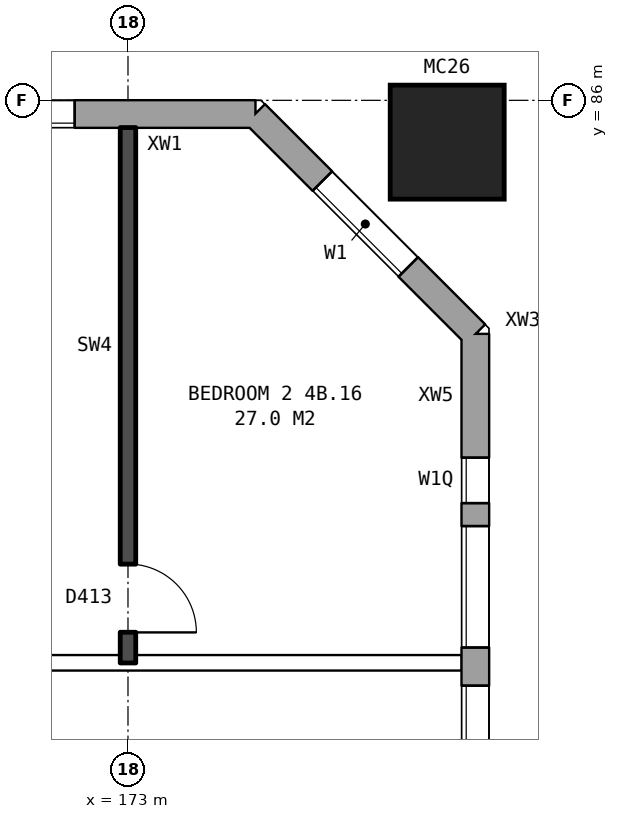
"""IFC4 building model, lengths in metres.
Left out: names, types, materials, properties, quantities, classifications, styles, units other than length and angle.
Written with IfcOpenShell. Run it as: python <this file> out.ifc"""

import sys

from ifc_helpers import new_model, si_unit, direction, frame, frame_2d, origin, origin_2d, place, context, subcontext, project, spatial, rectangle, hollow_rectangle, extrude, element, fill, save


model = new_model("IFC4")
c1 = context("Model", 3, precision=1e-05, world=origin(), true_north=direction((0.0, 1.0)))
c2 = subcontext(c1, "Body", "Model", "MODEL_VIEW")
j1 = project(units=[si_unit("LENGTHUNIT", "METRE"), si_unit("PLANEANGLEUNIT", "RADIAN")], contexts=[c1])
p1 = place(None, origin())
s1 = spatial("IfcSite", under=j1, at=p1, CompositionType="ELEMENT")
p2 = place(p1, origin())
s2 = spatial("IfcBuilding", under=s1, at=p2, CompositionType="ELEMENT")
p3 = place(p2, frame((0.0, 0.0, 19.5)))
s3 = spatial("IfcBuildingStorey", under=s2, at=p3, CompositionType="ELEMENT", Elevation=19.5)
p4 = place(p3, frame((177.2, 85.45, 0.0), z_axis=(0.0, 0.0, 1.0), x_axis=(1.0, 0.0, 0.0)))
e1 = element("IfcColumn", 1, at=p4, inside=s3, PredefinedType="COLUMN", context=c2, shape_type="SweptSolid", body=[
    extrude(hollow_rectangle(XDim=1.5, YDim=1.5, WallThickness=0.08, at=origin_2d()), origin(), (0.0, 0.0, 1.0), 3.1),
])
p5 = place(p3, frame((177.57, 57.075, 0.0), z_axis=(0.0, 0.0, 1.0), x_axis=(0.0, 1.0, 0.0)))
e2 = element("IfcWall", 2, at=p5, inside=s3, PredefinedType="STANDARD", context=c2, shape_type="SweptSolid", body=[
    extrude(rectangle(XDim=25.851, YDim=0.36, at=frame_2d((12.925, 0.0))), origin(), (0.0, 0.0, 1.0), 2.85),
])
p6 = place(p5, frame((1.0, 0.0, 0.8)))
e3 = element("IfcOpeningElement", 3, at=p6, cuts=e2, PredefinedType="OPENING", context=c2, shape_type="SweptSolid", body=[
    extrude(rectangle(XDim=1.2, YDim=0.9, at=frame_2d((0.6, 0.45))), frame((0.0, 0.19, 0.0), z_axis=(0.0, -1.0, 0.0), x_axis=(1.0, 0.0, 0.0)), (0.0, 0.0, 1.0), 0.38),
])
p7 = place(p5, frame((4.625, 0.0, 0.8)))
e4 = element("IfcOpeningElement", 4, at=p7, cuts=e2, PredefinedType="OPENING", context=c2, shape_type="SweptSolid", body=[
    extrude(rectangle(XDim=1.6, YDim=1.8, at=frame_2d((0.8, 0.9))), frame((0.0, 0.19, 0.0), z_axis=(0.0, -1.0, 0.0), x_axis=(1.0, 0.0, 0.0)), (0.0, 0.0, 1.0), 0.38),
])
p8 = place(p5, frame((7.625, 0.0, 0.8)))
e5 = element("IfcOpeningElement", 5, at=p8, cuts=e2, PredefinedType="OPENING", context=c2, shape_type="SweptSolid", body=[
    extrude(rectangle(XDim=1.6, YDim=1.8, at=frame_2d((0.8, 0.9))), frame((0.0, 0.19, 0.0), z_axis=(0.0, -1.0, 0.0), x_axis=(1.0, 0.0, 0.0)), (0.0, 0.0, 1.0), 0.38),
])
p9 = place(p5, frame((10.625, 0.0, 0.8)))
e6 = element("IfcOpeningElement", 6, at=p9, cuts=e2, PredefinedType="OPENING", context=c2, shape_type="SweptSolid", body=[
    extrude(rectangle(XDim=1.6, YDim=1.8, at=frame_2d((0.8, 0.9))), frame((0.0, 0.19, 0.0), z_axis=(0.0, -1.0, 0.0), x_axis=(1.0, 0.0, 0.0)), (0.0, 0.0, 1.0), 0.38),
])
p10 = place(p5, frame((13.625, 0.0, 0.8)))
e7 = element("IfcOpeningElement", 7, at=p10, cuts=e2, PredefinedType="OPENING", context=c2, shape_type="SweptSolid", body=[
    extrude(rectangle(XDim=1.6, YDim=1.8, at=frame_2d((0.8, 0.9))), frame((0.0, 0.19, 0.0), z_axis=(0.0, -1.0, 0.0), x_axis=(1.0, 0.0, 0.0)), (0.0, 0.0, 1.0), 0.38),
])
p11 = place(p5, frame((16.625, 0.0, 0.8)))
e8 = element("IfcOpeningElement", 8, at=p11, cuts=e2, PredefinedType="OPENING", context=c2, shape_type="SweptSolid", body=[
    extrude(rectangle(XDim=1.6, YDim=1.8, at=frame_2d((0.8, 0.9))), frame((0.0, 0.19, 0.0), z_axis=(0.0, -1.0, 0.0), x_axis=(1.0, 0.0, 0.0)), (0.0, 0.0, 1.0), 0.38),
])
p12 = place(p5, frame((19.625, 0.0, 0.8)))
e9 = element("IfcOpeningElement", 9, at=p12, cuts=e2, PredefinedType="OPENING", context=c2, shape_type="SweptSolid", body=[
    extrude(rectangle(XDim=1.6, YDim=1.8, at=frame_2d((0.8, 0.9))), frame((0.0, 0.19, 0.0), z_axis=(0.0, -1.0, 0.0), x_axis=(1.0, 0.0, 0.0)), (0.0, 0.0, 1.0), 0.38),
])
p13 = place(p5, frame((21.725, 0.0, 0.8)))
e10 = element("IfcOpeningElement", 10, at=p13, cuts=e2, PredefinedType="OPENING", context=c2, shape_type="SweptSolid", body=[
    extrude(rectangle(XDim=1.6, YDim=1.8, at=frame_2d((0.8, 0.9))), frame((0.0, 0.19, 0.0), z_axis=(0.0, -1.0, 0.0), x_axis=(1.0, 0.0, 0.0)), (0.0, 0.0, 1.0), 0.38),
])
p14 = place(p5, frame((2.5, 0.0, 0.8)))
e11 = element("IfcOpeningElement", 11, at=p14, cuts=e2, PredefinedType="OPENING", context=c2, shape_type="SweptSolid", body=[
    extrude(rectangle(XDim=1.4, YDim=1.8, at=frame_2d((0.7, 0.9))), frame((0.0, 0.19, 0.0), z_axis=(0.0, -1.0, 0.0), x_axis=(1.0, 0.0, 0.0)), (0.0, 0.0, 1.0), 0.38),
])
p15 = place(p5, frame((23.625, 0.0, 0.8)))
e12 = element("IfcOpeningElement", 12, at=p15, cuts=e2, PredefinedType="OPENING", context=c2, shape_type="SweptSolid", body=[
    extrude(rectangle(XDim=0.6, YDim=1.2, at=frame_2d((0.3, 0.6))), frame((0.0, 0.19, 0.0), z_axis=(0.0, -1.0, 0.0), x_axis=(1.0, 0.0, 0.0)), (0.0, 0.0, 1.0), 0.38),
])
p16 = place(p3, frame((177.57, 82.925, 0.0), z_axis=(0.0, 0.0, 1.0), x_axis=(-0.707106781187, 0.707106781187, 0.0)))
e13 = element("IfcWall", 13, at=p16, inside=s3, PredefinedType="STANDARD", context=c2, shape_type="SweptSolid", body=[
    extrude(rectangle(XDim=4.094, YDim=0.36, at=frame_2d((2.047, 0.0))), origin(), (0.0, 0.0, 1.0), 2.85),
])
p17 = place(p16, frame((1.247, 0.0, 0.8)))
e14 = element("IfcOpeningElement", 14, at=p17, cuts=e13, PredefinedType="OPENING", context=c2, shape_type="SweptSolid", body=[
    extrude(rectangle(XDim=1.6, YDim=1.8, at=frame_2d((0.8, 0.9))), frame((0.0, 0.19, 0.0), z_axis=(0.0, -1.0, 0.0), x_axis=(1.0, 0.0, 0.0)), (0.0, 0.0, 1.0), 0.38),
])
p18 = place(p3, frame((174.675, 85.82, 0.0), z_axis=(0.0, 0.0, 1.0), x_axis=(-1.0, 0.0, 0.0)))
e15 = element("IfcWall", 15, at=p18, inside=s3, PredefinedType="STANDARD", context=c2, shape_type="SweptSolid", body=[
    extrude(rectangle(XDim=40.601, YDim=0.36, at=frame_2d((20.3, 0.0))), origin(), (0.0, 0.0, 1.0), 2.85),
])
p19 = place(p18, frame((2.375, 0.0, 0.8)))
e16 = element("IfcOpeningElement", 16, at=p19, cuts=e15, PredefinedType="OPENING", context=c2, shape_type="SweptSolid", body=[
    extrude(rectangle(XDim=1.6, YDim=1.8, at=frame_2d((0.8, 0.9))), frame((0.0, 0.19, 0.0), z_axis=(0.0, -1.0, 0.0), x_axis=(1.0, 0.0, 0.0)), (0.0, 0.0, 1.0), 0.38),
])
p20 = place(p18, frame((5.375, 0.0, 0.8)))
e17 = element("IfcOpeningElement", 17, at=p20, cuts=e15, PredefinedType="OPENING", context=c2, shape_type="SweptSolid", body=[
    extrude(rectangle(XDim=1.6, YDim=1.8, at=frame_2d((0.8, 0.9))), frame((0.0, 0.19, 0.0), z_axis=(0.0, -1.0, 0.0), x_axis=(1.0, 0.0, 0.0)), (0.0, 0.0, 1.0), 0.38),
])
p21 = place(p18, frame((8.375, 0.0, 0.8)))
e18 = element("IfcOpeningElement", 18, at=p21, cuts=e15, PredefinedType="OPENING", context=c2, shape_type="SweptSolid", body=[
    extrude(rectangle(XDim=1.6, YDim=1.8, at=frame_2d((0.8, 0.9))), frame((0.0, 0.19, 0.0), z_axis=(0.0, -1.0, 0.0), x_axis=(1.0, 0.0, 0.0)), (0.0, 0.0, 1.0), 0.38),
])
p22 = place(p18, frame((11.375, 0.0, 0.8)))
e19 = element("IfcOpeningElement", 19, at=p22, cuts=e15, PredefinedType="OPENING", context=c2, shape_type="SweptSolid", body=[
    extrude(rectangle(XDim=1.6, YDim=1.8, at=frame_2d((0.8, 0.9))), frame((0.0, 0.19, 0.0), z_axis=(0.0, -1.0, 0.0), x_axis=(1.0, 0.0, 0.0)), (0.0, 0.0, 1.0), 0.38),
])
p23 = place(p18, frame((14.375, 0.0, 0.8)))
e20 = element("IfcOpeningElement", 20, at=p23, cuts=e15, PredefinedType="OPENING", context=c2, shape_type="SweptSolid", body=[
    extrude(rectangle(XDim=1.6, YDim=1.8, at=frame_2d((0.8, 0.9))), frame((0.0, 0.19, 0.0), z_axis=(0.0, -1.0, 0.0), x_axis=(1.0, 0.0, 0.0)), (0.0, 0.0, 1.0), 0.38),
])
p24 = place(p18, frame((17.375, 0.0, 0.8)))
e21 = element("IfcOpeningElement", 21, at=p24, cuts=e15, PredefinedType="OPENING", context=c2, shape_type="SweptSolid", body=[
    extrude(rectangle(XDim=1.6, YDim=1.8, at=frame_2d((0.8, 0.9))), frame((0.0, 0.19, 0.0), z_axis=(0.0, -1.0, 0.0), x_axis=(1.0, 0.0, 0.0)), (0.0, 0.0, 1.0), 0.38),
])
p25 = place(p18, frame((20.375, 0.0, 0.8)))
e22 = element("IfcOpeningElement", 22, at=p25, cuts=e15, PredefinedType="OPENING", context=c2, shape_type="SweptSolid", body=[
    extrude(rectangle(XDim=1.6, YDim=1.8, at=frame_2d((0.8, 0.9))), frame((0.0, 0.19, 0.0), z_axis=(0.0, -1.0, 0.0), x_axis=(1.0, 0.0, 0.0)), (0.0, 0.0, 1.0), 0.38),
])
p26 = place(p18, frame((23.375, 0.0, 0.8)))
e23 = element("IfcOpeningElement", 23, at=p26, cuts=e15, PredefinedType="OPENING", context=c2, shape_type="SweptSolid", body=[
    extrude(rectangle(XDim=1.6, YDim=1.8, at=frame_2d((0.8, 0.9))), frame((0.0, 0.19, 0.0), z_axis=(0.0, -1.0, 0.0), x_axis=(1.0, 0.0, 0.0)), (0.0, 0.0, 1.0), 0.38),
])
p27 = place(p18, frame((26.375, 0.0, 0.8)))
e24 = element("IfcOpeningElement", 24, at=p27, cuts=e15, PredefinedType="OPENING", context=c2, shape_type="SweptSolid", body=[
    extrude(rectangle(XDim=1.6, YDim=1.8, at=frame_2d((0.8, 0.9))), frame((0.0, 0.19, 0.0), z_axis=(0.0, -1.0, 0.0), x_axis=(1.0, 0.0, 0.0)), (0.0, 0.0, 1.0), 0.38),
])
p28 = place(p18, frame((29.375, 0.0, 0.8)))
e25 = element("IfcOpeningElement", 25, at=p28, cuts=e15, PredefinedType="OPENING", context=c2, shape_type="SweptSolid", body=[
    extrude(rectangle(XDim=1.6, YDim=1.8, at=frame_2d((0.8, 0.9))), frame((0.0, 0.19, 0.0), z_axis=(0.0, -1.0, 0.0), x_axis=(1.0, 0.0, 0.0)), (0.0, 0.0, 1.0), 0.38),
])
p29 = place(p18, frame((32.375, 0.0, 0.8)))
e26 = element("IfcOpeningElement", 26, at=p29, cuts=e15, PredefinedType="OPENING", context=c2, shape_type="SweptSolid", body=[
    extrude(rectangle(XDim=1.6, YDim=1.8, at=frame_2d((0.8, 0.9))), frame((0.0, 0.19, 0.0), z_axis=(0.0, -1.0, 0.0), x_axis=(1.0, 0.0, 0.0)), (0.0, 0.0, 1.0), 0.38),
])
p30 = place(p18, frame((35.375, 0.0, 0.8)))
e27 = element("IfcOpeningElement", 27, at=p30, cuts=e15, PredefinedType="OPENING", context=c2, shape_type="SweptSolid", body=[
    extrude(rectangle(XDim=1.6, YDim=1.8, at=frame_2d((0.8, 0.9))), frame((0.0, 0.19, 0.0), z_axis=(0.0, -1.0, 0.0), x_axis=(1.0, 0.0, 0.0)), (0.0, 0.0, 1.0), 0.38),
])
p31 = place(p18, frame((37.875, 0.0, 0.8)))
e28 = element("IfcOpeningElement", 28, at=p31, cuts=e15, PredefinedType="OPENING", context=c2, shape_type="SweptSolid", body=[
    extrude(rectangle(XDim=1.2, YDim=1.8, at=frame_2d((0.6, 0.9))), frame((0.0, 0.19, 0.0), z_axis=(0.0, -1.0, 0.0), x_axis=(1.0, 0.0, 0.0)), (0.0, 0.0, 1.0), 0.38),
])
p32 = place(p18, frame((39.375, 0.0, 0.8)))
e29 = element("IfcOpeningElement", 29, at=p32, cuts=e15, PredefinedType="OPENING", context=c2, shape_type="SweptSolid", body=[
    extrude(rectangle(XDim=0.6, YDim=1.2, at=frame_2d((0.3, 0.6))), frame((0.0, 0.19, 0.0), z_axis=(0.0, -1.0, 0.0), x_axis=(1.0, 0.0, 0.0)), (0.0, 0.0, 1.0), 0.38),
])
p33 = place(p3, frame((155.1, 78.6, 0.0), z_axis=(0.0, 0.0, 1.0), x_axis=(1.0, 0.0, 0.0)))
e30 = element("IfcWall", 30, at=p33, inside=s3, PredefinedType="PARTITIONING", context=c2, shape_type="SweptSolid", body=[
    extrude(rectangle(XDim=22.29, YDim=0.2, at=frame_2d((11.145, 0.0))), origin(), (0.0, 0.0, 1.0), 2.85),
])
p34 = place(p33, frame((2.45, 0.0, 0.0)))
e31 = element("IfcOpeningElement", 31, at=p34, cuts=e30, PredefinedType="OPENING", context=c2, shape_type="SweptSolid", body=[
    extrude(rectangle(XDim=1.0, YDim=2.1, at=frame_2d((0.5, 1.05))), frame((0.0, 0.11, 0.0), z_axis=(0.0, -1.0, 0.0), x_axis=(1.0, 0.0, 0.0)), (0.0, 0.0, 1.0), 0.22),
])
p35 = place(p33, frame((14.4, 0.0, 0.0)))
e32 = element("IfcOpeningElement", 32, at=p35, cuts=e30, PredefinedType="OPENING", context=c2, shape_type="SweptSolid", body=[
    extrude(rectangle(XDim=1.0, YDim=2.1, at=frame_2d((0.5, 1.05))), frame((0.0, 0.11, 0.0), z_axis=(0.0, -1.0, 0.0), x_axis=(1.0, 0.0, 0.0)), (0.0, 0.0, 1.0), 0.22),
])
p36 = place(p3, frame((173.0, 78.6, 0.0), z_axis=(0.0, 0.0, 1.0), x_axis=(0.0, 1.0, 0.0)))
e33 = element("IfcWall", 33, at=p36, inside=s3, PredefinedType="SOLIDWALL", context=c2, shape_type="SweptSolid", body=[
    extrude(rectangle(XDim=7.04, YDim=0.2, at=frame_2d((3.52, 0.0))), origin(), (0.0, 0.0, 1.0), 2.85),
])
p37 = place(p36, frame((0.4, 0.0, 0.0)))
e34 = element("IfcOpeningElement", 34, at=p37, cuts=e33, PredefinedType="OPENING", context=c2, shape_type="SweptSolid", body=[
    extrude(rectangle(XDim=0.9, YDim=2.1, at=frame_2d((0.45, 1.05))), frame((0.0, 0.11, 0.0), z_axis=(0.0, -1.0, 0.0), x_axis=(1.0, 0.0, 0.0)), (0.0, 0.0, 1.0), 0.22),
])
p38 = place(p12, origin())
e35 = element("IfcWindow", 35, at=p38, inside=s3, PartitioningType="SINGLE_PANEL", PredefinedType="WINDOW", context=c2, shape_type="SweptSolid", body=[
    extrude(rectangle(XDim=1.6, YDim=1.8, at=frame_2d((0.8, 0.9))), frame((0.0, 0.15, 0.0), z_axis=(0.0, -1.0, 0.0), x_axis=(1.0, 0.0, 0.0)), (0.0, 0.0, 1.0), 0.06),
])
fill(e9, e35)
p39 = place(p13, origin())
e36 = element("IfcWindow", 36, at=p39, inside=s3, PartitioningType="SINGLE_PANEL", PredefinedType="WINDOW", context=c2, shape_type="SweptSolid", body=[
    extrude(rectangle(XDim=1.6, YDim=1.8, at=frame_2d((0.8, 0.9))), frame((0.0, 0.15, 0.0), z_axis=(0.0, -1.0, 0.0), x_axis=(1.0, 0.0, 0.0)), (0.0, 0.0, 1.0), 0.06),
])
fill(e10, e36)
p40 = place(p17, origin())
e37 = element("IfcWindow", 37, at=p40, inside=s3, PartitioningType="SINGLE_PANEL", PredefinedType="WINDOW", context=c2, shape_type="SweptSolid", body=[
    extrude(rectangle(XDim=1.6, YDim=1.8, at=frame_2d((0.8, 0.9))), frame((0.0, 0.15, 0.0), z_axis=(0.0, -1.0, 0.0), x_axis=(1.0, 0.0, 0.0)), (0.0, 0.0, 1.0), 0.06),
])
fill(e14, e37)
p41 = place(p19, origin())
e38 = element("IfcWindow", 38, at=p41, inside=s3, PartitioningType="SINGLE_PANEL", PredefinedType="WINDOW", context=c2, shape_type="SweptSolid", body=[
    extrude(rectangle(XDim=1.6, YDim=1.8, at=frame_2d((0.8, 0.9))), frame((0.0, 0.15, 0.0), z_axis=(0.0, -1.0, 0.0), x_axis=(1.0, 0.0, 0.0)), (0.0, 0.0, 1.0), 0.06),
])
fill(e16, e38)
p42 = place(p37, frame((0.9, 0.0, 0.0), z_axis=(0.0, 0.0, 1.0), x_axis=(-1.0, 0.0, 0.0)))
e39 = element("IfcDoor", 39, at=p42, inside=s3, OperationType="SINGLE_SWING_RIGHT", PredefinedType="DOOR", context=c2, shape_type="SweptSolid", body=[
    extrude(rectangle(XDim=0.9, YDim=2.1, at=frame_2d((0.45, 1.05))), frame((0.0, 0.025, 0.0), z_axis=(0.0, -1.0, 0.0), x_axis=(1.0, 0.0, 0.0)), (0.0, 0.0, 1.0), 0.05),
])
fill(e34, e39)
p43 = place(p15, origin())
e40 = element("IfcWindow", 40, at=p43, inside=s3, PartitioningType="SINGLE_PANEL", PredefinedType="WINDOW", context=c2, shape_type="SweptSolid", body=[
    extrude(rectangle(XDim=0.6, YDim=1.2, at=frame_2d((0.3, 0.6))), frame((0.0, 0.15, 0.0), z_axis=(0.0, -1.0, 0.0), x_axis=(1.0, 0.0, 0.0)), (0.0, 0.0, 1.0), 0.06),
])
fill(e12, e40)
save(model, sys.argv[1])
